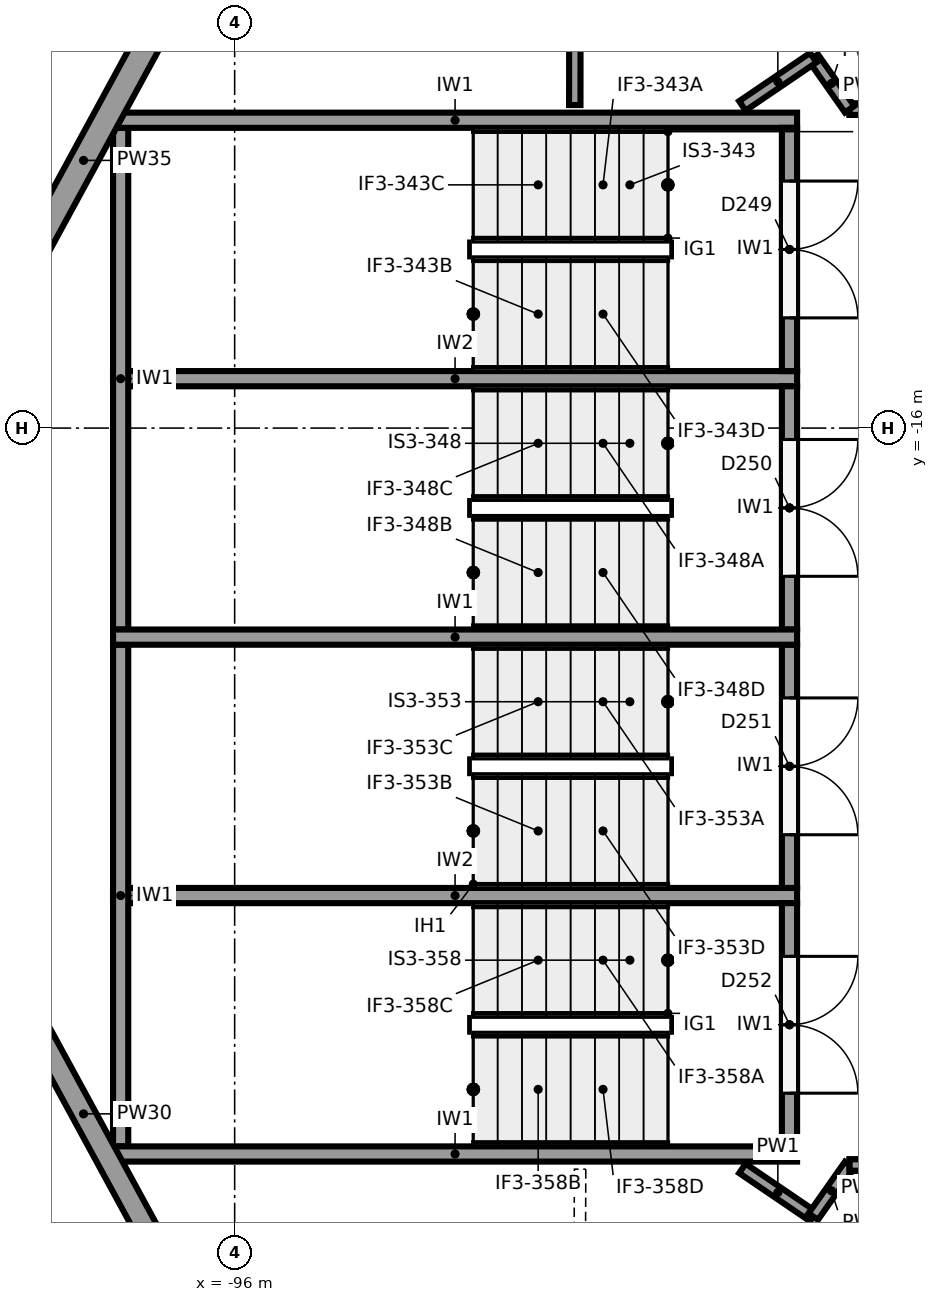
"""IFC4 building model, lengths in metres.
Left out: names, types, materials, properties, quantities, classifications, styles, units other than length and angle.
Written with IfcOpenShell. Run it as: python <this file> out.ifc"""

import sys

from ifc_helpers import new_model, si_unit, direction, frame, frame_2d, origin, place, context, subcontext, project, spatial, rectangle, extrude, element, fill, save


model = new_model("IFC4")
c1 = context("Model", 3, precision=1e-05, world=origin(), true_north=direction((0.0, 1.0)))
c2 = subcontext(c1, "Body", "Model", "MODEL_VIEW")
j1 = project(units=[si_unit("LENGTHUNIT", "METRE"), si_unit("PLANEANGLEUNIT", "RADIAN")], contexts=[c1])
p1 = place(None, origin())
s1 = spatial("IfcSite", under=j1, at=p1, CompositionType="ELEMENT")
p2 = place(p1, origin())
s2 = spatial("IfcBuilding", under=s1, at=p2, CompositionType="ELEMENT")
p3 = place(p2, frame((0.0, 0.0, 6.5)))
s3 = spatial("IfcBuildingStorey", under=s2, at=p3, CompositionType="ELEMENT", Elevation=6.5)
p4 = place(p3, frame((-101.161, -18.311, 0.0), z_axis=(0.0, 0.0, 1.0), x_axis=(0.477867771117, 0.878431780691, 0.0)))
e1 = element("IfcWall", 1, at=p4, inside=s3, PredefinedType="SOLIDWALL", context=c2, shape_type="SweptSolid", body=[
    extrude(rectangle(XDim=13.28, YDim=0.35, at=frame_2d((6.64, 0.0))), origin(), (0.0, 0.0, 1.0), 3.85),
])
p5 = place(p4, frame((8.93, 0.0, 0.0)))
e2 = element("IfcOpeningElement", 2, at=p5, cuts=e1, PredefinedType="OPENING", context=c2, shape_type="SweptSolid", body=[
    extrude(rectangle(XDim=2.4, YDim=2.8, at=frame_2d((1.2, 1.4))), frame((0.0, 0.185, 0.0), z_axis=(0.0, -1.0, 0.0), x_axis=(1.0, 0.0, 0.0)), (0.0, 0.0, 1.0), 0.37),
])
p6 = place(p3, frame((-94.815, -30.855, 0.0), z_axis=(0.0, 0.0, 1.0), x_axis=(-0.477867771117, 0.878431780691, 0.0)))
e3 = element("IfcWall", 3, at=p6, inside=s3, PredefinedType="SOLIDWALL", context=c2, shape_type="SweptSolid", body=[
    extrude(rectangle(XDim=13.28, YDim=0.3, at=frame_2d((6.64, 0.0))), origin(), (0.0, 0.0, 1.0), 3.85),
])
for number, where, z_axis, x_axis in (
    (4, (-97.6, -11.95, 0.0), (0.0, 0.0, 1.0), (1.0, 0.0, 0.0)),
    (5, (-97.6, -18.75, 0.0), (0.0, 0.0, 1.0), (1.0, 0.0, 0.0)),
    (6, (-97.6, -25.55, 0.0), (0.0, 0.0, 1.0), (1.0, 0.0, 0.0)),
):
    element("IfcWall", number, at=place(p3, frame(where, z_axis=z_axis, x_axis=x_axis)), inside=s3, PredefinedType="SHEAR", context=c2, shape_type="SweptSolid", body=[
        extrude(rectangle(XDim=9.0, YDim=0.2, at=frame_2d((4.5, 0.0))), origin(), (0.0, 0.0, 1.0), 5.15),
    ])
for number, where, z_axis, x_axis in (
    (7, (-97.5, -12.05, 0.0), (0.0, 0.0, 1.0), (0.0, -1.0, 0.0)),
    (8, (-97.5, -18.85, 0.0), (0.0, 0.0, 1.0), (0.0, -1.0, 0.0)),
):
    element("IfcWall", number, at=place(p3, frame(where, z_axis=z_axis, x_axis=x_axis)), inside=s3, PredefinedType="SHEAR", context=c2, shape_type="SweptSolid", body=[
        extrude(rectangle(XDim=6.6, YDim=0.2, at=frame_2d((3.3, 0.0))), origin(), (0.0, 0.0, 1.0), 5.15),
    ])
for number, where, z_axis, x_axis in (
    (9, (-97.6, -15.35, 0.0), (0.0, 0.0, 1.0), (1.0, 0.0, 0.0)),
    (10, (-97.6, -22.15, 0.0), (0.0, 0.0, 1.0), (1.0, 0.0, 0.0)),
):
    element("IfcWall", number, at=place(p3, frame(where, z_axis=z_axis, x_axis=x_axis)), inside=s3, PredefinedType="SHEAR", context=c2, shape_type="SweptSolid", body=[
        extrude(rectangle(XDim=9.0, YDim=0.2, at=frame_2d((4.5, 0.0))), origin(), (0.0, 0.0, 1.0), 5.15),
    ])
p7 = place(p3, frame((-88.7, -12.05, 0.0), z_axis=(0.0, 0.0, 1.0), x_axis=(0.0, -1.0, 0.0)))
e11 = element("IfcWall", 11, at=p7, inside=s3, PredefinedType="SHEAR", context=c2, shape_type="SweptSolid", body=[
    extrude(rectangle(XDim=3.2, YDim=0.2, at=frame_2d((1.6, 0.0))), origin(), (0.0, 0.0, 1.0), 5.15),
])
p8 = place(p7, frame((0.7, 0.0, 0.0)))
e12 = element("IfcOpeningElement", 12, at=p8, cuts=e11, PredefinedType="OPENING", context=c2, shape_type="SweptSolid", body=[
    extrude(rectangle(XDim=1.8, YDim=2.1, at=frame_2d((0.9, 1.05))), frame((0.0, 0.11, 0.0), z_axis=(0.0, -1.0, 0.0), x_axis=(1.0, 0.0, 0.0)), (0.0, 0.0, 1.0), 0.22),
])
p9 = place(p3, frame((-88.7, -15.45, 0.0), z_axis=(0.0, 0.0, 1.0), x_axis=(0.0, -1.0, 0.0)))
e13 = element("IfcWall", 13, at=p9, inside=s3, PredefinedType="SHEAR", context=c2, shape_type="SweptSolid", body=[
    extrude(rectangle(XDim=3.2, YDim=0.2, at=frame_2d((1.6, 0.0))), origin(), (0.0, 0.0, 1.0), 5.15),
])
p10 = place(p9, frame((0.7, 0.0, 0.0)))
e14 = element("IfcOpeningElement", 14, at=p10, cuts=e13, PredefinedType="OPENING", context=c2, shape_type="SweptSolid", body=[
    extrude(rectangle(XDim=1.8, YDim=2.1, at=frame_2d((0.9, 1.05))), frame((0.0, 0.11, 0.0), z_axis=(0.0, -1.0, 0.0), x_axis=(1.0, 0.0, 0.0)), (0.0, 0.0, 1.0), 0.22),
])
p11 = place(p3, frame((-88.7, -18.85, 0.0), z_axis=(0.0, 0.0, 1.0), x_axis=(0.0, -1.0, 0.0)))
e15 = element("IfcWall", 15, at=p11, inside=s3, PredefinedType="SHEAR", context=c2, shape_type="SweptSolid", body=[
    extrude(rectangle(XDim=3.2, YDim=0.2, at=frame_2d((1.6, 0.0))), origin(), (0.0, 0.0, 1.0), 5.15),
])
p12 = place(p11, frame((0.7, 0.0, 0.0)))
e16 = element("IfcOpeningElement", 16, at=p12, cuts=e15, PredefinedType="OPENING", context=c2, shape_type="SweptSolid", body=[
    extrude(rectangle(XDim=1.8, YDim=2.1, at=frame_2d((0.9, 1.05))), frame((0.0, 0.11, 0.0), z_axis=(0.0, -1.0, 0.0), x_axis=(1.0, 0.0, 0.0)), (0.0, 0.0, 1.0), 0.22),
])
p13 = place(p3, frame((-88.7, -22.25, 0.0), z_axis=(0.0, 0.0, 1.0), x_axis=(0.0, -1.0, 0.0)))
e17 = element("IfcWall", 17, at=p13, inside=s3, PredefinedType="SHEAR", context=c2, shape_type="SweptSolid", body=[
    extrude(rectangle(XDim=3.2, YDim=0.2, at=frame_2d((1.6, 0.0))), origin(), (0.0, 0.0, 1.0), 5.15),
])
p14 = place(p13, frame((0.7, 0.0, 0.0)))
e18 = element("IfcOpeningElement", 18, at=p14, cuts=e17, PredefinedType="OPENING", context=c2, shape_type="SweptSolid", body=[
    extrude(rectangle(XDim=1.8, YDim=2.1, at=frame_2d((0.9, 1.05))), frame((0.0, 0.11, 0.0), z_axis=(0.0, -1.0, 0.0), x_axis=(1.0, 0.0, 0.0)), (0.0, 0.0, 1.0), 0.22),
])
p15 = place(p3, frame((-91.519, -6.967, 0.0), z_axis=(0.0, 0.0, 1.0), x_axis=(-0.001174067593, -0.999999310782, 0.0)))
e19 = element("IfcWall", 19, at=p15, inside=s3, PredefinedType="PARTITIONING", context=c2, shape_type="SweptSolid", body=[
    extrude(rectangle(XDim=4.783, YDim=0.15, at=frame_2d((2.391, 0.0))), origin(), (0.0, 0.0, 1.0), 5.15),
])
p16 = place(p3, frame((-91.455, -25.75, 0.0), z_axis=(0.0, 0.0, 1.0), x_axis=(-0.003886987998, -0.999992445634, 0.0)))
e20 = element("IfcWall", 20, at=p16, inside=s3, PredefinedType="PARTITIONING", context=c2, shape_type="SweptSolid", body=[
    extrude(rectangle(XDim=4.711, YDim=0.15, at=frame_2d((2.355, 0.0))), origin(), (0.0, 0.0, 1.0), 5.15),
])
p17 = place(p16, frame((1.95, 0.0, 0.0)))
e21 = element("IfcOpeningElement", 21, at=p17, cuts=e20, PredefinedType="OPENING", context=c2, shape_type="SweptSolid", body=[
    extrude(rectangle(XDim=1.0, YDim=2.1, at=frame_2d((0.5, 1.05))), frame((0.0, 0.085, 0.0), z_axis=(0.0, -1.0, 0.0), x_axis=(1.0, 0.0, 0.0)), (0.0, 0.0, 1.0), 0.17),
])
p18 = place(p3, frame((-89.32, -25.74, 0.0), z_axis=(0.0, 0.0, 1.0), x_axis=(0.827055308354, -0.562120553728, 0.0)))
e22 = element("IfcWall", 22, at=p18, inside=s3, PredefinedType="PARTITIONING", context=c2, shape_type="SweptSolid", body=[
    extrude(rectangle(XDim=1.128, YDim=0.15, at=frame_2d((0.564, 0.0))), origin(), (0.0, 0.0, 1.0), 5.15),
])
p19 = place(p3, frame((-88.387, -26.374, 0.0), z_axis=(0.0, 0.0, 1.0), x_axis=(0.575376756214, 0.817888493872, 0.0)))
e23 = element("IfcWall", 23, at=p19, inside=s3, PredefinedType="PARTITIONING", context=c2, shape_type="SweptSolid", body=[
    extrude(rectangle(XDim=0.83, YDim=0.15, at=frame_2d((0.415, 0.0))), origin(), (0.0, 0.0, 1.0), 5.15),
])
p20 = place(p3, frame((-87.909, -25.695, 0.0), z_axis=(0.0, 0.0, 1.0), x_axis=(1.0, 0.0, 0.0)))
e24 = element("IfcWall", 24, at=p20, inside=s3, PredefinedType="PARTITIONING", context=c2, shape_type="SweptSolid", body=[
    extrude(rectangle(XDim=3.704, YDim=0.15, at=frame_2d((1.852, 0.0))), origin(), (0.0, 0.0, 1.0), 4.05),
])
p21 = place(p20, frame((0.65, 0.0, 0.0)))
e25 = element("IfcOpeningElement", 25, at=p21, cuts=e24, PredefinedType="OPENING", context=c2, shape_type="SweptSolid", body=[
    extrude(rectangle(XDim=1.8, YDim=2.1, at=frame_2d((0.9, 1.05))), frame((0.0, 0.085, 0.0), z_axis=(0.0, -1.0, 0.0), x_axis=(1.0, 0.0, 0.0)), (0.0, 0.0, 1.0), 0.17),
])
p22 = place(p3, frame((-87.909, -25.695, 4.05), z_axis=(0.0, 0.0, 1.0), x_axis=(1.0, 0.0, 0.0)))
e26 = element("IfcWall", 26, at=p22, inside=s3, PredefinedType="PARTITIONING", context=c2, shape_type="SweptSolid", body=[
    extrude(rectangle(XDim=0.6, YDim=0.15, at=frame_2d((0.3, 0.0))), origin(), (0.0, 0.0, 1.0), 1.1),
])
p23 = place(p3, frame((-81.555, -11.805, 0.0), z_axis=(0.0, 0.0, 1.0), x_axis=(-1.0, 0.0, 0.0)))
e27 = element("IfcWall", 27, at=p23, inside=s3, PredefinedType="PARTITIONING", context=c2, shape_type="SweptSolid", body=[
    extrude(rectangle(XDim=6.354, YDim=0.15, at=frame_2d((3.177, 0.0))), origin(), (0.0, 0.0, 1.0), 4.05),
])
p24 = place(p23, frame((3.85, 0.0, 0.0)))
e28 = element("IfcOpeningElement", 28, at=p24, cuts=e27, PredefinedType="OPENING", context=c2, shape_type="SweptSolid", body=[
    extrude(rectangle(XDim=1.8, YDim=2.1, at=frame_2d((0.9, 1.05))), frame((0.0, 0.085, 0.0), z_axis=(0.0, -1.0, 0.0), x_axis=(1.0, 0.0, 0.0)), (0.0, 0.0, 1.0), 0.17),
])
p25 = place(p3, frame((-87.255, -11.805, 4.05), z_axis=(0.0, 0.0, 1.0), x_axis=(-1.0, 0.0, 0.0)))
e29 = element("IfcWall", 29, at=p25, inside=s3, PredefinedType="PARTITIONING", context=c2, shape_type="SweptSolid", body=[
    extrude(rectangle(XDim=0.654, YDim=0.15, at=frame_2d((0.327, 0.0))), origin(), (0.0, 0.0, 1.0), 1.1),
])
p26 = place(p3, frame((-87.909, -11.805, 0.0), z_axis=(0.0, 0.0, 1.0), x_axis=(-0.575573582652, 0.81774999294, 0.0)))
e30 = element("IfcWall", 30, at=p26, inside=s3, PredefinedType="PARTITIONING", context=c2, shape_type="SweptSolid", body=[
    extrude(rectangle(XDim=0.83, YDim=0.15, at=frame_2d((0.415, 0.0))), origin(), (0.0, 0.0, 1.0), 5.15),
])
p27 = place(p3, frame((-88.387, -11.126, 0.0), z_axis=(0.0, 0.0, 1.0), x_axis=(-0.827055308354, -0.562120553728, 0.0)))
e31 = element("IfcWall", 31, at=p27, inside=s3, PredefinedType="PARTITIONING", context=c2, shape_type="SweptSolid", body=[
    extrude(rectangle(XDim=1.128, YDim=0.15, at=frame_2d((0.564, 0.0))), origin(), (0.0, 0.0, 1.0), 5.15),
])
p28 = place(p8, origin())
e32 = element("IfcDoor", 32, at=p28, inside=s3, OperationType="DOUBLE_DOOR_SINGLE_SWING", PredefinedType="DOOR", context=c2, shape_type="SweptSolid", body=[
    extrude(rectangle(XDim=1.8, YDim=2.1, at=frame_2d((0.9, 1.05))), frame((0.0, 0.025, 0.0), z_axis=(0.0, -1.0, 0.0), x_axis=(1.0, 0.0, 0.0)), (0.0, 0.0, 1.0), 0.05),
])
fill(e12, e32)
p29 = place(p10, origin())
e33 = element("IfcDoor", 33, at=p29, inside=s3, OperationType="DOUBLE_DOOR_SINGLE_SWING", PredefinedType="DOOR", context=c2, shape_type="SweptSolid", body=[
    extrude(rectangle(XDim=1.8, YDim=2.1, at=frame_2d((0.9, 1.05))), frame((0.0, 0.025, 0.0), z_axis=(0.0, -1.0, 0.0), x_axis=(1.0, 0.0, 0.0)), (0.0, 0.0, 1.0), 0.05),
])
fill(e14, e33)
p30 = place(p12, origin())
e34 = element("IfcDoor", 34, at=p30, inside=s3, OperationType="DOUBLE_DOOR_SINGLE_SWING", PredefinedType="DOOR", context=c2, shape_type="SweptSolid", body=[
    extrude(rectangle(XDim=1.8, YDim=2.1, at=frame_2d((0.9, 1.05))), frame((0.0, 0.025, 0.0), z_axis=(0.0, -1.0, 0.0), x_axis=(1.0, 0.0, 0.0)), (0.0, 0.0, 1.0), 0.05),
])
fill(e16, e34)
p31 = place(p14, origin())
e35 = element("IfcDoor", 35, at=p31, inside=s3, OperationType="DOUBLE_DOOR_SINGLE_SWING", PredefinedType="DOOR", context=c2, shape_type="SweptSolid", body=[
    extrude(rectangle(XDim=1.8, YDim=2.1, at=frame_2d((0.9, 1.05))), frame((0.0, 0.025, 0.0), z_axis=(0.0, -1.0, 0.0), x_axis=(1.0, 0.0, 0.0)), (0.0, 0.0, 1.0), 0.05),
])
fill(e18, e35)
save(model, sys.argv[1])
